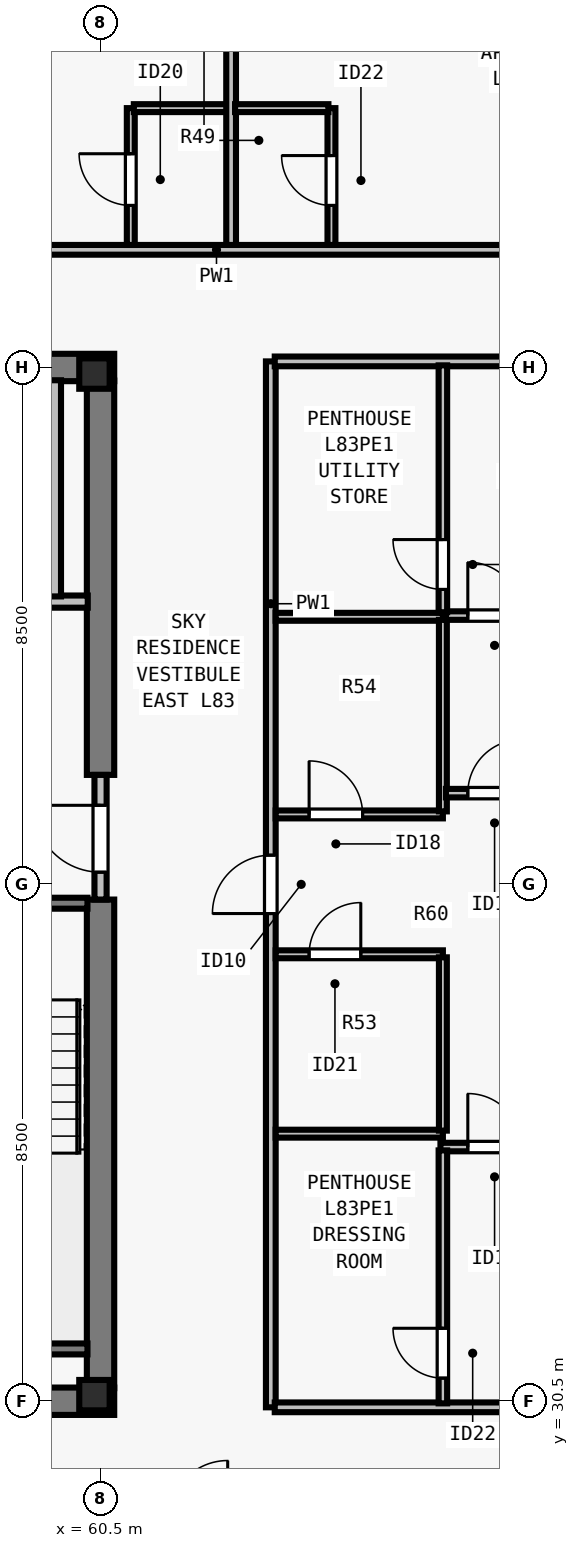
"""IFC4 building model, lengths in metres.
Left out: names, types, materials, properties, quantities, classifications, styles, units other than length and angle.
Written with IfcOpenShell. Run it as: python <this file> out.ifc"""

import sys

from ifc_helpers import new_model, si_unit, direction, frame, frame_2d, origin, origin_2d, place, context, subcontext, project, spatial, rectangle, i_section, extrude, element, fill, save


model = new_model("IFC4")
c1 = context("Model", 3, precision=1e-05, world=origin(), true_north=direction((0.0, 1.0)))
c2 = subcontext(c1, "Body", "Model", "MODEL_VIEW")
j1 = project(units=[si_unit("LENGTHUNIT", "METRE"), si_unit("PLANEANGLEUNIT", "RADIAN")], contexts=[c1])
p1 = place(None, origin())
s1 = spatial("IfcSite", under=j1, at=p1, CompositionType="ELEMENT")
p2 = place(p1, origin())
s2 = spatial("IfcBuilding", under=s1, at=p2, CompositionType="ELEMENT")
p3 = place(p2, frame((0.0, 0.0, 301.5)))
s3 = spatial("IfcBuildingStorey", under=s2, at=p3, CompositionType="ELEMENT", Elevation=301.5)
for number, where, z_axis, x_axis in (
    (1, (60.4, 30.6, 0.0), (0.0, 0.0, 1.0), (1.0, 0.0, 0.0)),
    (2, (60.4, 47.4, 0.0), (0.0, 0.0, 1.0), (1.0, 0.0, 0.0)),
):
    element("IfcColumn", number, at=place(p3, frame(where, z_axis=z_axis, x_axis=x_axis)), inside=s3, PredefinedType="COLUMN", context=c2, shape_type="SweptSolid", body=[
        extrude(i_section(OverallWidth=0.5, OverallDepth=0.5, WebThickness=0.028, FlangeThickness=0.045, at=origin_2d()), origin(), (0.0, 0.0, 1.0), 3.5),
    ])
for number, where, z_axis, x_axis in (
    (3, (43.275, 30.5, 0.0), (0.0, 0.0, 1.0), (1.0, 0.0, 0.0)),
    (4, (43.275, 47.5, 0.0), (0.0, 0.0, 1.0), (1.0, 0.0, 0.0)),
):
    element("IfcWall", number, at=place(p3, frame(where, z_axis=z_axis, x_axis=x_axis)), inside=s3, PredefinedType="SHEAR", context=c2, shape_type="SweptSolid", body=[
        extrude(rectangle(XDim=17.45, YDim=0.45, at=frame_2d((8.725, 0.0))), origin(), (0.0, 0.0, 1.0), 3.29),
    ])
p4 = place(p3, frame((60.5, 30.715, 0.0), z_axis=(0.0, 0.0, 1.0), x_axis=(0.0, 1.0, 0.0)))
e5 = element("IfcWall", 5, at=p4, inside=s3, PredefinedType="SHEAR", context=c2, shape_type="SweptSolid", body=[
    extrude(rectangle(XDim=8.035, YDim=0.45, at=frame_2d((4.018, 0.0))), origin(), (0.0, 0.0, 1.0), 3.29),
])
p5 = place(p3, frame((60.5, 40.8, 0.0), z_axis=(0.0, 0.0, 1.0), x_axis=(0.0, 1.0, 0.0)))
e6 = element("IfcWall", 6, at=p5, inside=s3, PredefinedType="SHEAR", context=c2, shape_type="SweptSolid", body=[
    extrude(rectangle(XDim=6.485, YDim=0.45, at=frame_2d((3.242, 0.0))), origin(), (0.0, 0.0, 1.0), 3.29),
])
p6 = place(p3, frame((60.5, 38.75, 0.0), z_axis=(0.0, 0.0, 1.0), x_axis=(0.0, 1.0, 0.0)))
e7 = element("IfcWall", 7, at=p6, inside=s3, PredefinedType="SOLIDWALL", context=c2, shape_type="SweptSolid", body=[
    extrude(rectangle(XDim=2.05, YDim=0.2, at=frame_2d((1.025, 0.0))), origin(), (0.0, 0.0, 1.0), 3.29),
])
p7 = place(p6, frame((0.45, 0.0, 0.0)))
e8 = element("IfcOpeningElement", 8, at=p7, cuts=e7, PredefinedType="OPENING", context=c2, shape_type="SweptSolid", body=[
    extrude(rectangle(XDim=1.1, YDim=2.15, at=frame_2d((0.55, 1.075))), frame((0.0, 0.11, 0.0), z_axis=(0.0, -1.0, 0.0), x_axis=(1.0, 0.0, 0.0)), (0.0, 0.0, 1.0), 0.22),
])
p8 = place(p3, frame((56.735, 43.65, 0.0), z_axis=(0.0, 0.0, 1.0), x_axis=(1.0, 0.0, 0.0)))
e9 = element("IfcWall", 9, at=p8, inside=s3, PredefinedType="SOLIDWALL", context=c2, shape_type="SweptSolid", body=[
    extrude(rectangle(XDim=3.555, YDim=0.2, at=frame_2d((1.777, 0.0))), origin(), (0.0, 0.0, 1.0), 3.29),
])
p9 = place(p8, frame((1.295, 0.0, 0.0)))
e10 = element("IfcOpeningElement", 10, at=p9, cuts=e9, PredefinedType="OPENING", context=c2, shape_type="SweptSolid", body=[
    extrude(rectangle(XDim=1.1, YDim=2.2, at=frame_2d((0.55, 1.1))), frame((0.0, 0.11, 0.0), z_axis=(0.0, -1.0, 0.0), x_axis=(1.0, 0.0, 0.0)), (0.0, 0.0, 1.0), 0.22),
])
p10 = place(p3, frame((59.75, 43.735, 0.0), z_axis=(0.0, 0.0, 1.0), x_axis=(0.0, 1.0, 0.0)))
e11 = element("IfcWall", 11, at=p10, inside=s3, PredefinedType="SOLIDWALL", context=c2, shape_type="SweptSolid", body=[
    extrude(rectangle(XDim=3.555, YDim=0.2, at=frame_2d((1.777, 0.0))), origin(), (0.0, 0.0, 1.0), 3.29),
])
p11 = place(p3, frame((31.285, 49.435, 0.0), z_axis=(0.0, 0.0, 1.0), x_axis=(1.0, 0.0, 0.0)))
e12 = element("IfcWall", 12, at=p11, inside=s3, PredefinedType="PARTITIONING", context=c2, shape_type="SweptSolid", body=[
    extrude(rectangle(XDim=41.43, YDim=0.16, at=frame_2d((20.715, 0.0))), origin(), (0.0, 0.0, 1.0), 3.009),
])
p12 = place(p11, frame((4.979, 0.0, 0.0)))
e13 = element("IfcOpeningElement", 13, at=p12, cuts=e12, PredefinedType="OPENING", context=c2, shape_type="SweptSolid", body=[
    extrude(rectangle(XDim=0.96, YDim=2.18, at=frame_2d((0.48, 1.09))), frame((0.0, 0.09, 0.0), z_axis=(0.0, -1.0, 0.0), x_axis=(1.0, 0.0, 0.0)), (0.0, 0.0, 1.0), 0.18),
])
p13 = place(p11, frame((15.145, 0.0, 0.0)))
e14 = element("IfcOpeningElement", 14, at=p13, cuts=e12, PredefinedType="OPENING", context=c2, shape_type="SweptSolid", body=[
    extrude(rectangle(XDim=0.96, YDim=2.18, at=frame_2d((0.48, 1.09))), frame((0.0, 0.09, 0.0), z_axis=(0.0, -1.0, 0.0), x_axis=(1.0, 0.0, 0.0)), (0.0, 0.0, 1.0), 0.18),
])
p14 = place(p11, frame((25.435, 0.0, 0.0)))
e15 = element("IfcOpeningElement", 15, at=p14, cuts=e12, PredefinedType="OPENING", context=c2, shape_type="SweptSolid", body=[
    extrude(rectangle(XDim=0.96, YDim=2.18, at=frame_2d((0.48, 1.09))), frame((0.0, 0.09, 0.0), z_axis=(0.0, -1.0, 0.0), x_axis=(1.0, 0.0, 0.0)), (0.0, 0.0, 1.0), 0.18),
])
p15 = place(p11, frame((35.849, 0.0, 0.0)))
e16 = element("IfcOpeningElement", 16, at=p15, cuts=e12, PredefinedType="OPENING", context=c2, shape_type="SweptSolid", body=[
    extrude(rectangle(XDim=0.96, YDim=2.18, at=frame_2d((0.48, 1.09))), frame((0.0, 0.09, 0.0), z_axis=(0.0, -1.0, 0.0), x_axis=(1.0, 0.0, 0.0)), (0.0, 0.0, 1.0), 0.18),
])
p16 = place(p3, frame((63.3, 30.4, 0.0), z_axis=(0.0, 0.0, 1.0), x_axis=(0.0, 1.0, 0.0)))
e17 = element("IfcWall", 17, at=p16, inside=s3, PredefinedType="PARTITIONING", context=c2, shape_type="SweptSolid", body=[
    extrude(rectangle(XDim=17.2, YDim=0.16, at=frame_2d((8.6, 0.0))), origin(), (0.0, 0.0, 1.0), 3.29),
])
p17 = place(p16, frame((8.12, 0.0, 0.0)))
e18 = element("IfcOpeningElement", 18, at=p17, cuts=e17, PredefinedType="OPENING", context=c2, shape_type="SweptSolid", body=[
    extrude(rectangle(XDim=0.96, YDim=2.18, at=frame_2d((0.48, 1.09))), frame((0.0, 0.09, 0.0), z_axis=(0.0, -1.0, 0.0), x_axis=(1.0, 0.0, 0.0)), (0.0, 0.0, 1.0), 0.18),
])
for number, where, z_axis, x_axis in (
    (19, (63.365, 30.4, 0.0), (0.0, 0.0, 1.0), (1.0, 0.0, 0.0)),
    (20, (63.365, 47.6, 0.0), (0.0, 0.0, 1.0), (1.0, 0.0, 0.0)),
):
    element("IfcWall", number, at=place(p3, frame(where, z_axis=z_axis, x_axis=x_axis)), inside=s3, PredefinedType="PARTITIONING", context=c2, shape_type="SweptSolid", body=[
        extrude(rectangle(XDim=9.35, YDim=0.16, at=frame_2d((4.675, 0.0))), origin(), (0.0, 0.0, 1.0), 3.29),
    ])
p18 = place(p3, frame((60.998, 49.515, 0.0), z_axis=(0.0, 0.0, 1.0), x_axis=(0.0, 1.0, 0.0)))
e21 = element("IfcWall", 21, at=p18, inside=s3, PredefinedType="PLUMBINGWALL", context=c2, shape_type="SweptSolid", body=[
    extrude(rectangle(XDim=2.25, YDim=0.13, at=frame_2d((1.125, 0.0))), origin(), (0.0, 0.0, 1.0), 3.29),
])
p19 = place(p18, frame((0.65, 0.0, 0.0)))
e22 = element("IfcOpeningElement", 22, at=p19, cuts=e21, PredefinedType="OPENING", context=c2, shape_type="SweptSolid", body=[
    extrude(rectangle(XDim=0.85, YDim=2.1, at=frame_2d((0.425, 1.05))), frame((0.0, 0.075, 0.0), z_axis=(0.0, -1.0, 0.0), x_axis=(1.0, 0.0, 0.0)), (0.0, 0.0, 1.0), 0.15),
])
p20 = place(p3, frame((61.048, 51.765, 0.0), z_axis=(0.0, 0.0, 1.0), x_axis=(1.0, 0.0, 0.0)))
e23 = element("IfcWall", 23, at=p20, inside=s3, PredefinedType="PLUMBINGWALL", context=c2, shape_type="SweptSolid", body=[
    extrude(rectangle(XDim=1.6, YDim=0.13, at=frame_2d((0.8, 0.0))), origin(), (0.0, 0.0, 1.0), 3.29),
])
p21 = place(p3, frame((62.647, 49.515, 0.0), z_axis=(0.0, 0.0, 1.0), x_axis=(0.0, 1.0, 0.0)))
e24 = element("IfcWall", 24, at=p21, inside=s3, PredefinedType="PARTITIONING", context=c2, shape_type="SweptSolid", body=[
    extrude(rectangle(XDim=10.185, YDim=0.16, at=frame_2d((5.093, 0.0))), origin(), (0.0, 0.0, 1.0), 2.653),
])
p22 = place(p3, frame((64.298, 49.515, 0.0), z_axis=(0.0, 0.0, 1.0), x_axis=(0.0, 1.0, 0.0)))
e25 = element("IfcWall", 25, at=p22, inside=s3, PredefinedType="PLUMBINGWALL", context=c2, shape_type="SweptSolid", body=[
    extrude(rectangle(XDim=2.25, YDim=0.13, at=frame_2d((1.125, 0.0))), origin(), (0.0, 0.0, 1.0), 3.29),
])
p23 = place(p22, frame((0.65, 0.0, 0.0)))
e26 = element("IfcOpeningElement", 26, at=p23, cuts=e25, PredefinedType="OPENING", context=c2, shape_type="SweptSolid", body=[
    extrude(rectangle(XDim=0.82, YDim=2.1, at=frame_2d((0.41, 1.05))), frame((0.0, 0.075, 0.0), z_axis=(0.0, -1.0, 0.0), x_axis=(1.0, 0.0, 0.0)), (0.0, 0.0, 1.0), 0.15),
])
p24 = place(p3, frame((62.712, 51.765, 0.0), z_axis=(0.0, 0.0, 1.0), x_axis=(1.0, 0.0, 0.0)))
e27 = element("IfcWall", 27, at=p24, inside=s3, PredefinedType="PLUMBINGWALL", context=c2, shape_type="SweptSolid", body=[
    extrude(rectangle(XDim=1.535, YDim=0.13, at=frame_2d((0.768, 0.0))), origin(), (0.0, 0.0, 1.0), 3.29),
])
p25 = place(p3, frame((63.38, 34.9, 0.0), z_axis=(0.0, 0.0, 1.0), x_axis=(1.0, 0.0, 0.0)))
e28 = element("IfcWall", 28, at=p25, inside=s3, PredefinedType="PLUMBINGWALL", context=c2, shape_type="SweptSolid", body=[
    extrude(rectangle(XDim=2.75, YDim=0.13, at=frame_2d((1.375, 0.0))), origin(), (0.0, 0.0, 1.0), 3.29),
])
p26 = place(p3, frame((63.38, 37.85, 0.0), z_axis=(0.0, 0.0, 1.0), x_axis=(1.0, 0.0, 0.0)))
e29 = element("IfcWall", 29, at=p26, inside=s3, PredefinedType="PLUMBINGWALL", context=c2, shape_type="SweptSolid", body=[
    extrude(rectangle(XDim=2.75, YDim=0.13, at=frame_2d((1.375, 0.0))), origin(), (0.0, 0.0, 1.0), 3.29),
])
p27 = place(p26, frame((0.55, 0.0, 0.0)))
e30 = element("IfcOpeningElement", 30, at=p27, cuts=e29, PredefinedType="OPENING", context=c2, shape_type="SweptSolid", body=[
    extrude(rectangle(XDim=0.85, YDim=2.08, at=frame_2d((0.425, 1.04))), frame((0.0, 0.075, 0.0), z_axis=(0.0, -1.0, 0.0), x_axis=(1.0, 0.0, 0.0)), (0.0, 0.0, 1.0), 0.15),
])
p28 = place(p3, frame((66.13, 34.95, 0.0), z_axis=(0.0, 0.0, 1.0), x_axis=(0.0, 1.0, 0.0)))
e31 = element("IfcWall", 31, at=p28, inside=s3, PredefinedType="PLUMBINGWALL", context=c2, shape_type="SweptSolid", body=[
    extrude(rectangle(XDim=2.85, YDim=0.13, at=frame_2d((1.425, 0.0))), origin(), (0.0, 0.0, 1.0), 3.29),
])
p29 = place(p3, frame((63.38, 43.4, 0.0), z_axis=(0.0, 0.0, 1.0), x_axis=(1.0, 0.0, 0.0)))
e32 = element("IfcWall", 32, at=p29, inside=s3, PredefinedType="PLUMBINGWALL", context=c2, shape_type="SweptSolid", body=[
    extrude(rectangle(XDim=2.75, YDim=0.13, at=frame_2d((1.375, 0.0))), origin(), (0.0, 0.0, 1.0), 3.29),
])
p30 = place(p3, frame((63.38, 40.15, 0.0), z_axis=(0.0, 0.0, 1.0), x_axis=(1.0, 0.0, 0.0)))
e33 = element("IfcWall", 33, at=p30, inside=s3, PredefinedType="PLUMBINGWALL", context=c2, shape_type="SweptSolid", body=[
    extrude(rectangle(XDim=2.75, YDim=0.13, at=frame_2d((1.375, 0.0))), origin(), (0.0, 0.0, 1.0), 3.29),
])
p31 = place(p30, frame((0.55, 0.0, 0.0)))
e34 = element("IfcOpeningElement", 34, at=p31, cuts=e33, PredefinedType="OPENING", context=c2, shape_type="SweptSolid", body=[
    extrude(rectangle(XDim=0.88, YDim=2.1, at=frame_2d((0.44, 1.05))), frame((0.0, 0.075, 0.0), z_axis=(0.0, -1.0, 0.0), x_axis=(1.0, 0.0, 0.0)), (0.0, 0.0, 1.0), 0.15),
])
p32 = place(p3, frame((66.13, 40.2, 0.0), z_axis=(0.0, 0.0, 1.0), x_axis=(0.0, 1.0, 0.0)))
e35 = element("IfcWall", 35, at=p32, inside=s3, PredefinedType="PLUMBINGWALL", context=c2, shape_type="SweptSolid", body=[
    extrude(rectangle(XDim=3.15, YDim=0.13, at=frame_2d((1.575, 0.0))), origin(), (0.0, 0.0, 1.0), 3.29),
])
p33 = place(p3, frame((66.09, 34.68, 0.0), z_axis=(0.0, 0.0, 1.0), x_axis=(1.0, 0.0, 0.0)))
e36 = element("IfcWall", 36, at=p33, inside=s3, PredefinedType="PARTITIONING", context=c2, shape_type="SweptSolid", body=[
    extrude(rectangle(XDim=4.175, YDim=0.14, at=frame_2d((2.087, 0.0))), origin(), (0.0, 0.0, 1.0), 3.29),
])
p34 = place(p33, frame((0.45, 0.0, 0.0)))
e37 = element("IfcOpeningElement", 37, at=p34, cuts=e36, PredefinedType="OPENING", context=c2, shape_type="SweptSolid", body=[
    extrude(rectangle(XDim=0.88, YDim=2.1, at=frame_2d((0.44, 1.05))), frame((0.0, 0.08, 0.0), z_axis=(0.0, -1.0, 0.0), x_axis=(1.0, 0.0, 0.0)), (0.0, 0.0, 1.0), 0.16),
])
p35 = place(p3, frame((66.13, 30.465, 0.0), z_axis=(0.0, 0.0, 1.0), x_axis=(0.0, 1.0, 0.0)))
e38 = element("IfcWall", 38, at=p35, inside=s3, PredefinedType="PARTITIONING", context=c2, shape_type="SweptSolid", body=[
    extrude(rectangle(XDim=4.16, YDim=0.14, at=frame_2d((2.08, 0.0))), origin(), (0.0, 0.0, 1.0), 3.29),
])
p36 = place(p35, frame((0.415, 0.0, 0.0)))
e39 = element("IfcOpeningElement", 39, at=p36, cuts=e38, PredefinedType="OPENING", context=c2, shape_type="SweptSolid", body=[
    extrude(rectangle(XDim=0.82, YDim=2.1, at=frame_2d((0.41, 1.05))), frame((0.0, 0.08, 0.0), z_axis=(0.0, -1.0, 0.0), x_axis=(1.0, 0.0, 0.0)), (0.0, 0.0, 1.0), 0.16),
])
p37 = place(p3, frame((66.18, 43.42, 0.0), z_axis=(0.0, 0.0, 1.0), x_axis=(1.0, 0.0, 0.0)))
e40 = element("IfcWall", 40, at=p37, inside=s3, PredefinedType="PARTITIONING", context=c2, shape_type="SweptSolid", body=[
    extrude(rectangle(XDim=6.44, YDim=0.14, at=frame_2d((3.22, 0.0))), origin(), (0.0, 0.0, 1.0), 3.29),
])
p38 = place(p37, frame((0.36, 0.0, 0.0)))
e41 = element("IfcOpeningElement", 41, at=p38, cuts=e40, PredefinedType="OPENING", context=c2, shape_type="SweptSolid", body=[
    extrude(rectangle(XDim=0.88, YDim=2.1, at=frame_2d((0.44, 1.05))), frame((0.0, 0.08, 0.0), z_axis=(0.0, -1.0, 0.0), x_axis=(1.0, 0.0, 0.0)), (0.0, 0.0, 1.0), 0.16),
])
p39 = place(p3, frame((66.13, 43.475, 0.0), z_axis=(0.0, 0.0, 1.0), x_axis=(0.0, 1.0, 0.0)))
e42 = element("IfcWall", 42, at=p39, inside=s3, PredefinedType="PARTITIONING", context=c2, shape_type="SweptSolid", body=[
    extrude(rectangle(XDim=4.06, YDim=0.14, at=frame_2d((2.03, 0.0))), origin(), (0.0, 0.0, 1.0), 3.29),
])
p40 = place(p39, frame((0.375, 0.0, 0.0)))
e43 = element("IfcOpeningElement", 43, at=p40, cuts=e42, PredefinedType="OPENING", context=c2, shape_type="SweptSolid", body=[
    extrude(rectangle(XDim=0.82, YDim=2.1, at=frame_2d((0.41, 1.05))), frame((0.0, 0.08, 0.0), z_axis=(0.0, -1.0, 0.0), x_axis=(1.0, 0.0, 0.0)), (0.0, 0.0, 1.0), 0.16),
])
p41 = place(p3, frame((66.18, 40.5, 0.0), z_axis=(0.0, 0.0, 1.0), x_axis=(1.0, 0.0, 0.0)))
e44 = element("IfcWall", 44, at=p41, inside=s3, PredefinedType="PARTITIONING", context=c2, shape_type="SweptSolid", body=[
    extrude(rectangle(XDim=4.085, YDim=0.14, at=frame_2d((2.042, 0.0))), origin(), (0.0, 0.0, 1.0), 3.29),
])
p42 = place(p41, frame((0.36, 0.0, 0.0)))
e45 = element("IfcOpeningElement", 45, at=p42, cuts=e44, PredefinedType="OPENING", context=c2, shape_type="SweptSolid", body=[
    extrude(rectangle(XDim=0.88, YDim=2.1, at=frame_2d((0.44, 1.05))), frame((0.0, 0.08, 0.0), z_axis=(0.0, -1.0, 0.0), x_axis=(1.0, 0.0, 0.0)), (0.0, 0.0, 1.0), 0.16),
])
p43 = place(p3, frame((57.005, 38.69, 0.0), z_axis=(0.0, 0.0, 1.0), x_axis=(1.0, 0.0, 0.0)))
e46 = element("IfcWall", 46, at=p43, inside=s3, PredefinedType="SOLIDWALL", context=c2, shape_type="SweptSolid", body=[
    extrude(rectangle(XDim=3.28, YDim=0.18, at=frame_2d((1.64, 0.0))), origin(), (0.0, 0.0, 1.0), 3.29),
])
p44 = place(p43, frame((1.165, 0.0, 0.0)))
e47 = element("IfcOpeningElement", 47, at=p44, cuts=e46, PredefinedType="OPENING", context=c2, shape_type="SweptSolid", body=[
    extrude(rectangle(XDim=0.95, YDim=2.15, at=frame_2d((0.475, 1.075))), frame((0.0, 0.1, 0.0), z_axis=(0.0, -1.0, 0.0), x_axis=(1.0, 0.0, 0.0)), (0.0, 0.0, 1.0), 0.2),
])
p45 = place(p3, frame((57.005, 31.36, 0.0), z_axis=(0.0, 0.0, 1.0), x_axis=(1.0, 0.0, 0.0)))
e48 = element("IfcWall", 48, at=p45, inside=s3, PredefinedType="SOLIDWALL", context=c2, shape_type="SweptSolid", body=[
    extrude(rectangle(XDim=3.28, YDim=0.18, at=frame_2d((1.64, 0.0))), origin(), (0.0, 0.0, 1.0), 3.29),
])
p46 = place(p7, origin())
e49 = element("IfcDoor", 49, at=p46, inside=s3, OperationType="SINGLE_SWING_RIGHT", PredefinedType="DOOR", context=c2, shape_type="SweptSolid", body=[
    extrude(rectangle(XDim=1.1, YDim=2.15, at=frame_2d((0.55, 1.075))), frame((0.0, 0.025, 0.0), z_axis=(0.0, -1.0, 0.0), x_axis=(1.0, 0.0, 0.0)), (0.0, 0.0, 1.0), 0.05),
])
fill(e8, e49)
p47 = place(p19, origin())
e50 = element("IfcDoor", 50, at=p47, inside=s3, OperationType="SINGLE_SWING_RIGHT", PredefinedType="DOOR", context=c2, shape_type="SweptSolid", body=[
    extrude(rectangle(XDim=0.85, YDim=2.1, at=frame_2d((0.425, 1.05))), frame((0.0, 0.025, 0.0), z_axis=(0.0, -1.0, 0.0), x_axis=(1.0, 0.0, 0.0)), (0.0, 0.0, 1.0), 0.05),
])
fill(e22, e50)
p48 = place(p23, origin())
e51 = element("IfcDoor", 51, at=p48, inside=s3, OperationType="SINGLE_SWING_RIGHT", PredefinedType="DOOR", context=c2, shape_type="SweptSolid", body=[
    extrude(rectangle(XDim=0.82, YDim=2.1, at=frame_2d((0.41, 1.05))), frame((0.0, 0.025, 0.0), z_axis=(0.0, -1.0, 0.0), x_axis=(1.0, 0.0, 0.0)), (0.0, 0.0, 1.0), 0.05),
])
fill(e26, e51)
p49 = place(p27, origin())
e52 = element("IfcDoor", 52, at=p49, inside=s3, OperationType="SINGLE_SWING_RIGHT", PredefinedType="DOOR", context=c2, shape_type="SweptSolid", body=[
    extrude(rectangle(XDim=0.85, YDim=2.08, at=frame_2d((0.425, 1.04))), frame((0.0, 0.025, 0.0), z_axis=(0.0, -1.0, 0.0), x_axis=(1.0, 0.0, 0.0)), (0.0, 0.0, 1.0), 0.05),
])
fill(e30, e52)
p50 = place(p31, origin())
e53 = element("IfcDoor", 53, at=p50, inside=s3, OperationType="SINGLE_SWING_LEFT", PredefinedType="DOOR", context=c2, shape_type="SweptSolid", body=[
    extrude(rectangle(XDim=0.88, YDim=2.1, at=frame_2d((0.44, 1.05))), frame((0.0, 0.025, 0.0), z_axis=(0.0, -1.0, 0.0), x_axis=(1.0, 0.0, 0.0)), (0.0, 0.0, 1.0), 0.05),
])
fill(e34, e53)
p51 = place(p36, origin())
e54 = element("IfcDoor", 54, at=p51, inside=s3, OperationType="SINGLE_SWING_RIGHT", PredefinedType="DOOR", context=c2, shape_type="SweptSolid", body=[
    extrude(rectangle(XDim=0.82, YDim=2.1, at=frame_2d((0.41, 1.05))), frame((0.0, 0.025, 0.0), z_axis=(0.0, -1.0, 0.0), x_axis=(1.0, 0.0, 0.0)), (0.0, 0.0, 1.0), 0.05),
])
fill(e39, e54)
p52 = place(p34, origin())
e55 = element("IfcDoor", 55, at=p52, inside=s3, OperationType="SINGLE_SWING_LEFT", PredefinedType="DOOR", context=c2, shape_type="SweptSolid", body=[
    extrude(rectangle(XDim=0.88, YDim=2.1, at=frame_2d((0.44, 1.05))), frame((0.0, 0.025, 0.0), z_axis=(0.0, -1.0, 0.0), x_axis=(1.0, 0.0, 0.0)), (0.0, 0.0, 1.0), 0.05),
])
fill(e37, e55)
p53 = place(p40, origin())
e56 = element("IfcDoor", 56, at=p53, inside=s3, OperationType="SINGLE_SWING_RIGHT", PredefinedType="DOOR", context=c2, shape_type="SweptSolid", body=[
    extrude(rectangle(XDim=0.82, YDim=2.1, at=frame_2d((0.41, 1.05))), frame((0.0, 0.025, 0.0), z_axis=(0.0, -1.0, 0.0), x_axis=(1.0, 0.0, 0.0)), (0.0, 0.0, 1.0), 0.05),
])
fill(e43, e56)
p54 = place(p38, origin())
e57 = element("IfcDoor", 57, at=p54, inside=s3, OperationType="SINGLE_SWING_LEFT", PredefinedType="DOOR", context=c2, shape_type="SweptSolid", body=[
    extrude(rectangle(XDim=0.88, YDim=2.1, at=frame_2d((0.44, 1.05))), frame((0.0, 0.025, 0.0), z_axis=(0.0, -1.0, 0.0), x_axis=(1.0, 0.0, 0.0)), (0.0, 0.0, 1.0), 0.05),
])
fill(e41, e57)
p55 = place(p42, origin())
e58 = element("IfcDoor", 58, at=p55, inside=s3, OperationType="SINGLE_SWING_RIGHT", PredefinedType="DOOR", context=c2, shape_type="SweptSolid", body=[
    extrude(rectangle(XDim=0.88, YDim=2.1, at=frame_2d((0.44, 1.05))), frame((0.0, 0.025, 0.0), z_axis=(0.0, -1.0, 0.0), x_axis=(1.0, 0.0, 0.0)), (0.0, 0.0, 1.0), 0.05),
])
fill(e45, e58)
p56 = place(p17, origin())
e59 = element("IfcDoor", 59, at=p56, inside=s3, OperationType="SINGLE_SWING_LEFT", PredefinedType="DOOR", context=c2, shape_type="SweptSolid", body=[
    extrude(rectangle(XDim=0.96, YDim=2.18, at=frame_2d((0.48, 1.09))), frame((0.0, 0.025, 0.0), z_axis=(0.0, -1.0, 0.0), x_axis=(1.0, 0.0, 0.0)), (0.0, 0.0, 1.0), 0.05),
])
fill(e18, e59)
save(model, sys.argv[1])
